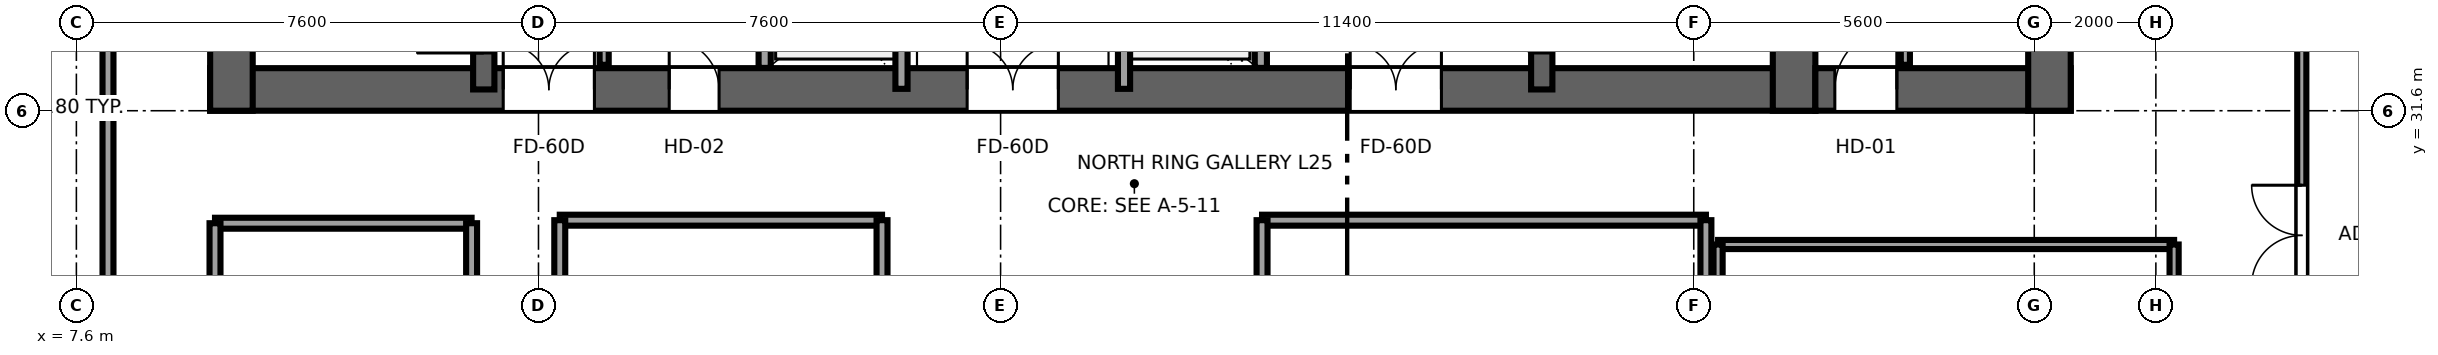
"""IFC4 building model, lengths in metres.
Left out: names, types, materials, properties, quantities, classifications, styles, units other than length and angle.
Written with IfcOpenShell. Run it as: python <this file> out.ifc"""

import sys

from ifc_helpers import new_model, si_unit, direction, frame, frame_2d, origin, place, context, subcontext, project, spatial, rectangle, extrude, source, transform, mapped, element, fill, save


model = new_model("IFC4")
c1 = context("Model", 3, precision=1e-05, world=origin(), true_north=direction((0.0, 1.0)))
c2 = subcontext(c1, "Body", "Model", "MODEL_VIEW")
j1 = project(units=[si_unit("LENGTHUNIT", "METRE"), si_unit("PLANEANGLEUNIT", "RADIAN")], contexts=[c1])
p1 = place(None, origin())
s1 = spatial("IfcSite", under=j1, at=p1, CompositionType="ELEMENT")
p2 = place(p1, origin())
s2 = spatial("IfcBuilding", under=s1, at=p2, CompositionType="ELEMENT")
p3 = place(p2, frame((0.0, 0.0, 100.9)))
s3 = spatial("IfcBuildingStorey", under=s2, at=p3, CompositionType="ELEMENT", Elevation=100.9)
p4 = place(p3, frame((9.8, 31.95, 0.0), z_axis=(0.0, 0.0, 1.0), x_axis=(1.0, 0.0, 0.0)))
e1 = element("IfcWall", 1, at=p4, inside=s3, PredefinedType="SHEAR", context=c2, shape_type="SweptSolid", body=[
    extrude(rectangle(XDim=26.4, YDim=0.7, at=frame_2d((13.2, 0.0))), origin(), (0.0, 0.0, 1.0), 3.55),
])
p5 = place(p4, frame((6.32, 0.0, 0.0), z_axis=(0.0, 0.0, 1.0), x_axis=(-1.0, 0.0, 0.0)))
e2 = element("IfcOpeningElement", 2, at=p5, cuts=e1, PredefinedType="OPENING", context=c2, shape_type="SweptSolid", body=[
    extrude(rectangle(XDim=1.5, YDim=2.04, at=frame_2d((0.75, 1.02))), frame((0.0, 0.36, 0.0), z_axis=(0.0, -1.0, 0.0), x_axis=(1.0, 0.0, 0.0)), (0.0, 0.0, 1.0), 0.72),
])
p6 = place(p4, frame((13.95, 0.0, 0.0), z_axis=(0.0, 0.0, 1.0), x_axis=(-1.0, 0.0, 0.0)))
e3 = element("IfcOpeningElement", 3, at=p6, cuts=e1, PredefinedType="OPENING", context=c2, shape_type="SweptSolid", body=[
    extrude(rectangle(XDim=1.5, YDim=2.04, at=frame_2d((0.75, 1.02))), frame((0.0, 0.36, 0.0), z_axis=(0.0, -1.0, 0.0), x_axis=(1.0, 0.0, 0.0)), (0.0, 0.0, 1.0), 0.72),
])
p7 = place(p4, frame((20.25, 0.0, 0.0), z_axis=(0.0, 0.0, 1.0), x_axis=(-1.0, 0.0, 0.0)))
e4 = element("IfcOpeningElement", 4, at=p7, cuts=e1, PredefinedType="OPENING", context=c2, shape_type="SweptSolid", body=[
    extrude(rectangle(XDim=1.5, YDim=2.04, at=frame_2d((0.75, 1.02))), frame((0.0, 0.36, 0.0), z_axis=(0.0, -1.0, 0.0), x_axis=(1.0, 0.0, 0.0)), (0.0, 0.0, 1.0), 0.72),
])
p8 = place(p4, frame((8.37, 0.0, 0.0), z_axis=(0.0, 0.0, 1.0), x_axis=(-1.0, 0.0, 0.0)))
e5 = element("IfcOpeningElement", 5, at=p8, cuts=e1, PredefinedType="OPENING", context=c2, shape_type="SweptSolid", body=[
    extrude(rectangle(XDim=0.82, YDim=2.01, at=frame_2d((0.41, 1.005))), frame((0.0, 0.36, 0.0), z_axis=(0.0, -1.0, 0.0), x_axis=(1.0, 0.0, 0.0)), (0.0, 0.0, 1.0), 0.72),
])
for number, where, z_axis, x_axis in (
    (6, (10.15, 31.6, 0.0), (0.0, 0.0, 1.0), (0.0, 1.0, 0.0)),
    (7, (35.85, 31.6, 0.0), (0.0, 0.0, 1.0), (0.0, 1.0, 0.0)),
):
    element("IfcWall", number, at=place(p3, frame(where, z_axis=z_axis, x_axis=x_axis)), inside=s3, PredefinedType="SHEAR", context=c2, shape_type="SweptSolid", body=[
        extrude(rectangle(XDim=13.6, YDim=0.7, at=frame_2d((6.8, 0.0))), origin(), (0.0, 0.0, 1.0), 3.55),
    ])
p9 = place(p3, frame((14.3, 31.95, 0.0), z_axis=(0.0, 0.0, 1.0), x_axis=(0.0, 1.0, 0.0)))
e8 = element("IfcWall", 8, at=p9, inside=s3, PredefinedType="SHEAR", context=c2, shape_type="SweptSolid", body=[
    extrude(rectangle(XDim=12.9, YDim=0.35, at=frame_2d((6.45, 0.0))), origin(), (0.0, 0.0, 1.0), 3.55),
])
p10 = place(p9, frame((0.6, 0.0, 0.0)))
e9 = element("IfcOpeningElement", 9, at=p10, cuts=e8, PredefinedType="OPENING", context=c2, shape_type="SweptSolid", body=[
    extrude(rectangle(XDim=1.1, YDim=2.12, at=frame_2d((0.55, 1.06))), frame((0.0, 0.185, 0.0), z_axis=(0.0, -1.0, 0.0), x_axis=(1.0, 0.0, 0.0)), (0.0, 0.0, 1.0), 0.37),
])
p11 = place(p3, frame((31.7, 31.95, 0.0), z_axis=(0.0, 0.0, 1.0), x_axis=(0.0, 1.0, 0.0)))
e10 = element("IfcWall", 10, at=p11, inside=s3, PredefinedType="SHEAR", context=c2, shape_type="SweptSolid", body=[
    extrude(rectangle(XDim=12.9, YDim=0.35, at=frame_2d((6.45, 0.0))), origin(), (0.0, 0.0, 1.0), 3.55),
])
p12 = place(p11, frame((1.7, 0.0, 0.0), z_axis=(0.0, 0.0, 1.0), x_axis=(-1.0, 0.0, 0.0)))
e11 = element("IfcOpeningElement", 11, at=p12, cuts=e10, PredefinedType="OPENING", context=c2, shape_type="SweptSolid", body=[
    extrude(rectangle(XDim=1.1, YDim=2.12, at=frame_2d((0.55, 1.06))), frame((0.0, 0.185, 0.0), z_axis=(0.0, -1.0, 0.0), x_axis=(1.0, 0.0, 0.0)), (0.0, 0.0, 1.0), 0.37),
])
p13 = place(p3, frame((36.2, 31.95, 0.0), z_axis=(0.0, 0.0, 1.0), x_axis=(1.0, 0.0, 0.0)))
e12 = element("IfcWall", 12, at=p13, inside=s3, PredefinedType="SHEAR", context=c2, shape_type="SweptSolid", body=[
    extrude(rectangle(XDim=4.2, YDim=0.7, at=frame_2d((2.1, 0.0))), origin(), (0.0, 0.0, 1.0), 3.55),
])
p14 = place(p13, frame((1.34, 0.0, 0.0), z_axis=(0.0, 0.0, 1.0), x_axis=(-1.0, 0.0, 0.0)))
e13 = element("IfcOpeningElement", 13, at=p14, cuts=e12, PredefinedType="OPENING", context=c2, shape_type="SweptSolid", body=[
    extrude(rectangle(XDim=1.02, YDim=2.03, at=frame_2d((0.51, 1.015))), frame((0.0, 0.36, 0.0), z_axis=(0.0, -1.0, 0.0), x_axis=(1.0, 0.0, 0.0)), (0.0, 0.0, 1.0), 0.72),
])
p15 = place(p3, frame((40.05, 31.6, 0.0), z_axis=(0.0, 0.0, 1.0), x_axis=(0.0, 1.0, 0.0)))
e14 = element("IfcWall", 14, at=p15, inside=s3, PredefinedType="SHEAR", context=c2, shape_type="SweptSolid", body=[
    extrude(rectangle(XDim=13.6, YDim=0.7, at=frame_2d((6.8, 0.0))), origin(), (0.0, 0.0, 1.0), 3.55),
])
for number, where, z_axis, x_axis in (
    (15, (18.92, 32.304, 0.0), (0.0, 0.0, 1.0), (0.0, 1.0, 0.0)),
    (16, (27.08, 32.304, 0.0), (0.0, 0.0, 1.0), (0.0, 1.0, 0.0)),
):
    element("IfcWall", number, at=place(p3, frame(where, z_axis=z_axis, x_axis=x_axis)), inside=s3, PredefinedType="SOLIDWALL", context=c2, shape_type="SweptSolid", body=[
        extrude(rectangle(XDim=3.846, YDim=0.2, at=frame_2d((1.923, 0.0))), origin(), (0.0, 0.0, 1.0), 3.37),
    ])
p16 = place(p3, frame((21.17, 31.96, 0.0), z_axis=(0.0, 0.0, 1.0), x_axis=(0.0, 1.0, 0.0)))
e17 = element("IfcWall", 17, at=p16, inside=s3, PredefinedType="SOLIDWALL", context=c2, shape_type="SweptSolid", body=[
    extrude(rectangle(XDim=12.58, YDim=0.2, at=frame_2d((6.29, 0.0))), origin(), (0.0, 0.0, 1.0), 3.37),
])
p17 = place(p16, frame((0.74, 0.0, 0.0)))
e18 = element("IfcOpeningElement", 18, at=p17, cuts=e17, PredefinedType="OPENING", context=c2, shape_type="SweptSolid", body=[
    extrude(rectangle(XDim=1.1, YDim=2.12, at=frame_2d((0.55, 1.06))), frame((0.0, 0.11, 0.0), z_axis=(0.0, -1.0, 0.0), x_axis=(1.0, 0.0, 0.0)), (0.0, 0.0, 1.0), 0.22),
])
p18 = place(p16, frame((3.24, 0.0, 0.0)))
e19 = element("IfcOpeningElement", 19, at=p18, cuts=e17, PredefinedType="OPENING", context=c2, shape_type="SweptSolid", body=[
    extrude(rectangle(XDim=1.1, YDim=2.12, at=frame_2d((0.55, 1.06))), frame((0.0, 0.11, 0.0), z_axis=(0.0, -1.0, 0.0), x_axis=(1.0, 0.0, 0.0)), (0.0, 0.0, 1.0), 0.22),
])
p19 = place(p16, frame((5.74, 0.0, 0.0)))
e20 = element("IfcOpeningElement", 20, at=p19, cuts=e17, PredefinedType="OPENING", context=c2, shape_type="SweptSolid", body=[
    extrude(rectangle(XDim=1.1, YDim=2.12, at=frame_2d((0.55, 1.06))), frame((0.0, 0.11, 0.0), z_axis=(0.0, -1.0, 0.0), x_axis=(1.0, 0.0, 0.0)), (0.0, 0.0, 1.0), 0.22),
])
p20 = place(p16, frame((8.24, 0.0, 0.0)))
e21 = element("IfcOpeningElement", 21, at=p20, cuts=e17, PredefinedType="OPENING", context=c2, shape_type="SweptSolid", body=[
    extrude(rectangle(XDim=1.1, YDim=2.12, at=frame_2d((0.55, 1.06))), frame((0.0, 0.11, 0.0), z_axis=(0.0, -1.0, 0.0), x_axis=(1.0, 0.0, 0.0)), (0.0, 0.0, 1.0), 0.22),
])
p21 = place(p3, frame((24.83, 31.96, 0.0), z_axis=(0.0, 0.0, 1.0), x_axis=(0.0, 1.0, 0.0)))
e22 = element("IfcWall", 22, at=p21, inside=s3, PredefinedType="SOLIDWALL", context=c2, shape_type="SweptSolid", body=[
    extrude(rectangle(XDim=12.58, YDim=0.2, at=frame_2d((6.29, 0.0))), origin(), (0.0, 0.0, 1.0), 3.37),
])
p22 = place(p21, frame((0.74, 0.0, 0.0)))
e23 = element("IfcOpeningElement", 23, at=p22, cuts=e22, PredefinedType="OPENING", context=c2, shape_type="SweptSolid", body=[
    extrude(rectangle(XDim=1.1, YDim=2.12, at=frame_2d((0.55, 1.06))), frame((0.0, 0.11, 0.0), z_axis=(0.0, -1.0, 0.0), x_axis=(1.0, 0.0, 0.0)), (0.0, 0.0, 1.0), 0.22),
])
p23 = place(p21, frame((3.24, 0.0, 0.0)))
e24 = element("IfcOpeningElement", 24, at=p23, cuts=e22, PredefinedType="OPENING", context=c2, shape_type="SweptSolid", body=[
    extrude(rectangle(XDim=1.1, YDim=2.12, at=frame_2d((0.55, 1.06))), frame((0.0, 0.11, 0.0), z_axis=(0.0, -1.0, 0.0), x_axis=(1.0, 0.0, 0.0)), (0.0, 0.0, 1.0), 0.22),
])
p24 = place(p21, frame((5.74, 0.0, 0.0)))
e25 = element("IfcOpeningElement", 25, at=p24, cuts=e22, PredefinedType="OPENING", context=c2, shape_type="SweptSolid", body=[
    extrude(rectangle(XDim=1.1, YDim=2.12, at=frame_2d((0.55, 1.06))), frame((0.0, 0.11, 0.0), z_axis=(0.0, -1.0, 0.0), x_axis=(1.0, 0.0, 0.0)), (0.0, 0.0, 1.0), 0.22),
])
p25 = place(p21, frame((8.24, 0.0, 0.0)))
e26 = element("IfcOpeningElement", 26, at=p25, cuts=e22, PredefinedType="OPENING", context=c2, shape_type="SweptSolid", body=[
    extrude(rectangle(XDim=1.1, YDim=2.12, at=frame_2d((0.55, 1.06))), frame((0.0, 0.11, 0.0), z_axis=(0.0, -1.0, 0.0), x_axis=(1.0, 0.0, 0.0)), (0.0, 0.0, 1.0), 0.22),
])
p26 = place(p3, frame((16.28, 32.355, 0.0), z_axis=(0.0, 0.0, 1.0), x_axis=(0.0, 1.0, 0.0)))
e27 = element("IfcWall", 27, at=p26, inside=s3, PredefinedType="PARTITIONING", context=c2, shape_type="SweptSolid", body=[
    extrude(rectangle(XDim=0.865, YDim=0.15, at=frame_2d((0.433, 0.0))), origin(), (0.0, 0.0, 1.0), 3.37),
])
p27 = place(p3, frame((37.68, 32.355, 0.0), z_axis=(0.0, 0.0, 1.0), x_axis=(0.0, 1.0, 0.0)))
e28 = element("IfcWall", 28, at=p27, inside=s3, PredefinedType="PARTITIONING", context=c2, shape_type="SweptSolid", body=[
    extrude(rectangle(XDim=3.845, YDim=0.15, at=frame_2d((1.922, 0.0))), origin(), (0.0, 0.0, 1.0), 3.37),
])
p28 = place(p27, frame((1.413, 0.0, 0.0)))
e29 = element("IfcOpeningElement", 29, at=p28, cuts=e28, PredefinedType="OPENING", context=c2, shape_type="SweptSolid", body=[
    extrude(rectangle(XDim=1.02, YDim=2.03, at=frame_2d((0.51, 1.015))), frame((0.0, 0.085, 0.0), z_axis=(0.0, -1.0, 0.0), x_axis=(1.0, 0.0, 0.0)), (0.0, 0.0, 1.0), 0.17),
])
p29 = place(p3, frame((8.12, 20.7, 0.0), z_axis=(0.0, 0.0, 1.0), x_axis=(0.0, 1.0, 0.0)))
e30 = element("IfcWall", 30, at=p29, inside=s3, PredefinedType="PARTITIONING", context=c2, shape_type="SweptSolid", body=[
    extrude(rectangle(XDim=15.1, YDim=0.18, at=frame_2d((7.55, 0.0))), origin(), (0.0, 0.0, 1.0), 3.37),
])
p30 = place(p29, frame((5.15, 0.0, 0.0)))
e31 = element("IfcOpeningElement", 31, at=p30, cuts=e30, PredefinedType="OPENING", context=c2, shape_type="SweptSolid", body=[
    extrude(rectangle(XDim=1.65, YDim=2.15, at=frame_2d((0.825, 1.075))), frame((0.0, 0.1, 0.0), z_axis=(0.0, -1.0, 0.0), x_axis=(1.0, 0.0, 0.0)), (0.0, 0.0, 1.0), 0.2),
])
p31 = place(p3, frame((44.2, 24.5, 0.0), z_axis=(0.0, 0.0, 1.0), x_axis=(0.0, 1.0, 0.0)))
e32 = element("IfcWall", 32, at=p31, inside=s3, PredefinedType="PARTITIONING", context=c2, shape_type="SweptSolid", body=[
    extrude(rectangle(XDim=10.1, YDim=0.15, at=frame_2d((5.05, 0.0))), origin(), (0.0, 0.0, 1.0), 3.37),
])
p32 = place(p31, frame((4.225, 0.0, 0.0)))
e33 = element("IfcOpeningElement", 33, at=p32, cuts=e32, PredefinedType="OPENING", context=c2, shape_type="SweptSolid", body=[
    extrude(rectangle(XDim=1.65, YDim=2.15, at=frame_2d((0.825, 1.075))), frame((0.0, 0.085, 0.0), z_axis=(0.0, -1.0, 0.0), x_axis=(1.0, 0.0, 0.0)), (0.0, 0.0, 1.0), 0.17),
])
p33 = place(p3, frame((9.88, 29.75, 0.0), z_axis=(0.0, 0.0, 1.0), x_axis=(1.0, 0.0, 0.0)))
e34 = element("IfcWall", 34, at=p33, inside=s3, PredefinedType="PARTITIONING", context=c2, shape_type="SweptSolid", body=[
    extrude(rectangle(XDim=4.22, YDim=0.18, at=frame_2d((2.11, 0.0))), origin(), (0.0, 0.0, 1.0), 3.37),
])
for number, where, z_axis, x_axis in (
    (35, (9.88, 20.7, 0.0), (0.0, 0.0, 1.0), (0.0, 1.0, 0.0)),
    (36, (14.1, 20.7, 0.0), (0.0, 0.0, 1.0), (0.0, 1.0, 0.0)),
):
    element("IfcWall", number, at=place(p3, frame(where, z_axis=z_axis, x_axis=x_axis)), inside=s3, PredefinedType="PARTITIONING", context=c2, shape_type="SweptSolid", body=[
        extrude(rectangle(XDim=9.05, YDim=0.18, at=frame_2d((4.525, 0.0))), origin(), (0.0, 0.0, 1.0), 3.37),
    ])
p34 = place(p3, frame((27.1, 29.8, 0.0), z_axis=(0.0, 0.0, 1.0), x_axis=(1.0, 0.0, 0.0)))
e37 = element("IfcWall", 37, at=p34, inside=s3, PredefinedType="PARTITIONING", context=c2, shape_type="SweptSolid", body=[
    extrude(rectangle(XDim=7.3, YDim=0.18, at=frame_2d((3.65, 0.0))), origin(), (0.0, 0.0, 1.0), 3.37),
])
for number, where, z_axis, x_axis in (
    (38, (27.1, 20.7, 0.0), (0.0, 0.0, 1.0), (0.0, 1.0, 0.0)),
    (39, (34.4, 20.7, 0.0), (0.0, 0.0, 1.0), (0.0, 1.0, 0.0)),
):
    element("IfcWall", number, at=place(p3, frame(where, z_axis=z_axis, x_axis=x_axis)), inside=s3, PredefinedType="PARTITIONING", context=c2, shape_type="SweptSolid", body=[
        extrude(rectangle(XDim=9.1, YDim=0.18, at=frame_2d((4.55, 0.0))), origin(), (0.0, 0.0, 1.0), 3.37),
    ])
p35 = place(p3, frame((15.55, 29.8, 0.0), z_axis=(0.0, 0.0, 1.0), x_axis=(1.0, 0.0, 0.0)))
e40 = element("IfcWall", 40, at=p35, inside=s3, PredefinedType="PARTITIONING", context=c2, shape_type="SweptSolid", body=[
    extrude(rectangle(XDim=5.3, YDim=0.18, at=frame_2d((2.65, 0.0))), origin(), (0.0, 0.0, 1.0), 3.37),
])
for number, where, z_axis, x_axis in (
    (41, (15.55, 20.7, 0.0), (0.0, 0.0, 1.0), (0.0, 1.0, 0.0)),
    (42, (20.85, 20.7, 0.0), (0.0, 0.0, 1.0), (0.0, 1.0, 0.0)),
):
    element("IfcWall", number, at=place(p3, frame(where, z_axis=z_axis, x_axis=x_axis)), inside=s3, PredefinedType="PARTITIONING", context=c2, shape_type="SweptSolid", body=[
        extrude(rectangle(XDim=9.1, YDim=0.18, at=frame_2d((4.55, 0.0))), origin(), (0.0, 0.0, 1.0), 3.37),
    ])
p36 = place(p3, frame((34.6, 29.4, 0.0), z_axis=(0.0, 0.0, 1.0), x_axis=(1.0, 0.0, 0.0)))
e43 = element("IfcWall", 43, at=p36, inside=s3, PredefinedType="PARTITIONING", context=c2, shape_type="SweptSolid", body=[
    extrude(rectangle(XDim=7.5, YDim=0.15, at=frame_2d((3.75, 0.0))), origin(), (0.0, 0.0, 1.0), 3.37),
])
p37 = place(p3, frame((34.6, 20.7, 0.0), z_axis=(0.0, 0.0, 1.0), x_axis=(0.0, 1.0, 0.0)))
e44 = element("IfcWall", 44, at=p37, inside=s3, PredefinedType="PARTITIONING", context=c2, shape_type="SweptSolid", body=[
    extrude(rectangle(XDim=8.7, YDim=0.15, at=frame_2d((4.35, 0.0))), origin(), (0.0, 0.0, 1.0), 3.37),
])
p38 = place(p3, frame((42.1, 20.7, 0.0), z_axis=(0.0, 0.0, 1.0), x_axis=(0.0, 1.0, 0.0)))
e45 = element("IfcWall", 45, at=p38, inside=s3, PredefinedType="PARTITIONING", context=c2, shape_type="SweptSolid", body=[
    extrude(rectangle(XDim=8.7, YDim=0.15, at=frame_2d((4.35, 0.0))), origin(), (0.0, 0.0, 1.0), 2.16),
])
m1 = source(origin(), c2, "Body", "SweptSolid", [
    extrude(rectangle(XDim=1.1, YDim=2.12, at=frame_2d((0.55, 1.06))), frame((0.0, 0.025, 0.0), z_axis=(0.0, -1.0, 0.0), x_axis=(1.0, 0.0, 0.0)), (0.0, 0.0, 1.0), 0.05),
])
p39 = place(p10, origin())
e46 = element("IfcDoor", 46, at=p39, inside=s3, OperationType="SINGLE_SWING_LEFT", PredefinedType="DOOR", context=c2, shape_type="MappedRepresentation", body=[
    mapped(m1, transform((0.0, 0.0, 0.0), x_axis=(1.0, 0.0, 0.0), y_axis=(0.0, 1.0, 0.0), z_axis=(0.0, 0.0, 1.0), scale=1.0)),
])
fill(e9, e46)
p40 = place(p12, origin())
e47 = element("IfcDoor", 47, at=p40, inside=s3, OperationType="SINGLE_SWING_RIGHT", PredefinedType="DOOR", context=c2, shape_type="MappedRepresentation", body=[
    mapped(m1, transform((0.0, 0.0, 0.0), x_axis=(1.0, 0.0, 0.0), y_axis=(0.0, 1.0, 0.0), z_axis=(0.0, 0.0, 1.0), scale=1.0)),
])
fill(e11, e47)
m2 = source(origin(), c2, "Body", "SweptSolid", [
    extrude(rectangle(XDim=1.5, YDim=2.04, at=frame_2d((0.75, 1.02))), frame((0.0, 0.025, 0.0), z_axis=(0.0, -1.0, 0.0), x_axis=(1.0, 0.0, 0.0)), (0.0, 0.0, 1.0), 0.05),
])
p41 = place(p5, origin())
e48 = element("IfcDoor", 48, at=p41, inside=s3, OperationType="DOUBLE_DOOR_SINGLE_SWING", PredefinedType="DOOR", context=c2, shape_type="MappedRepresentation", body=[
    mapped(m2, transform((0.0, 0.0, 0.0), x_axis=(1.0, 0.0, 0.0), y_axis=(0.0, 1.0, 0.0), z_axis=(0.0, 0.0, 1.0), scale=1.0)),
])
fill(e2, e48)
p42 = place(p6, origin())
e49 = element("IfcDoor", 49, at=p42, inside=s3, OperationType="DOUBLE_DOOR_SINGLE_SWING", PredefinedType="DOOR", context=c2, shape_type="MappedRepresentation", body=[
    mapped(m2, transform((0.0, 0.0, 0.0), x_axis=(1.0, 0.0, 0.0), y_axis=(0.0, 1.0, 0.0), z_axis=(0.0, 0.0, 1.0), scale=1.0)),
])
fill(e3, e49)
p43 = place(p7, origin())
e50 = element("IfcDoor", 50, at=p43, inside=s3, OperationType="DOUBLE_DOOR_SINGLE_SWING", PredefinedType="DOOR", context=c2, shape_type="MappedRepresentation", body=[
    mapped(m2, transform((0.0, 0.0, 0.0), x_axis=(1.0, 0.0, 0.0), y_axis=(0.0, 1.0, 0.0), z_axis=(0.0, 0.0, 1.0), scale=1.0)),
])
fill(e4, e50)
m3 = source(origin(), c2, "Body", "SweptSolid", [
    extrude(rectangle(XDim=0.82, YDim=2.01, at=frame_2d((0.41, 1.005))), frame((0.0, 0.025, 0.0), z_axis=(0.0, -1.0, 0.0), x_axis=(1.0, 0.0, 0.0)), (0.0, 0.0, 1.0), 0.05),
])
p44 = place(p8, origin())
e51 = element("IfcDoor", 51, at=p44, inside=s3, OperationType="SINGLE_SWING_LEFT", PredefinedType="DOOR", context=c2, shape_type="MappedRepresentation", body=[
    mapped(m3, transform((0.0, 0.0, 0.0), x_axis=(1.0, 0.0, 0.0), y_axis=(0.0, 1.0, 0.0), z_axis=(0.0, 0.0, 1.0), scale=1.0)),
])
fill(e5, e51)
m4 = source(origin(), c2, "Body", "SweptSolid", [
    extrude(rectangle(XDim=1.02, YDim=2.03, at=frame_2d((0.51, 1.015))), frame((0.0, 0.025, 0.0), z_axis=(0.0, -1.0, 0.0), x_axis=(1.0, 0.0, 0.0)), (0.0, 0.0, 1.0), 0.05),
])
p45 = place(p14, origin())
e52 = element("IfcDoor", 52, at=p45, inside=s3, OperationType="SINGLE_SWING_RIGHT", PredefinedType="DOOR", context=c2, shape_type="MappedRepresentation", body=[
    mapped(m4, transform((0.0, 0.0, 0.0), x_axis=(1.0, 0.0, 0.0), y_axis=(0.0, 1.0, 0.0), z_axis=(0.0, 0.0, 1.0), scale=1.0)),
])
fill(e13, e52)
m5 = source(origin(), c2, "Body", "SweptSolid", [
    extrude(rectangle(XDim=1.65, YDim=2.15, at=frame_2d((0.825, 1.075))), frame((0.0, 0.025, 0.0), z_axis=(0.0, -1.0, 0.0), x_axis=(1.0, 0.0, 0.0)), (0.0, 0.0, 1.0), 0.05),
])
p46 = place(p32, origin())
e53 = element("IfcDoor", 53, at=p46, inside=s3, OperationType="DOUBLE_DOOR_SINGLE_SWING", PredefinedType="DOOR", context=c2, shape_type="MappedRepresentation", body=[
    mapped(m5, transform((0.0, 0.0, 0.0), x_axis=(1.0, 0.0, 0.0), y_axis=(0.0, 1.0, 0.0), z_axis=(0.0, 0.0, 1.0), scale=1.0)),
])
fill(e33, e53)
save(model, sys.argv[1])
